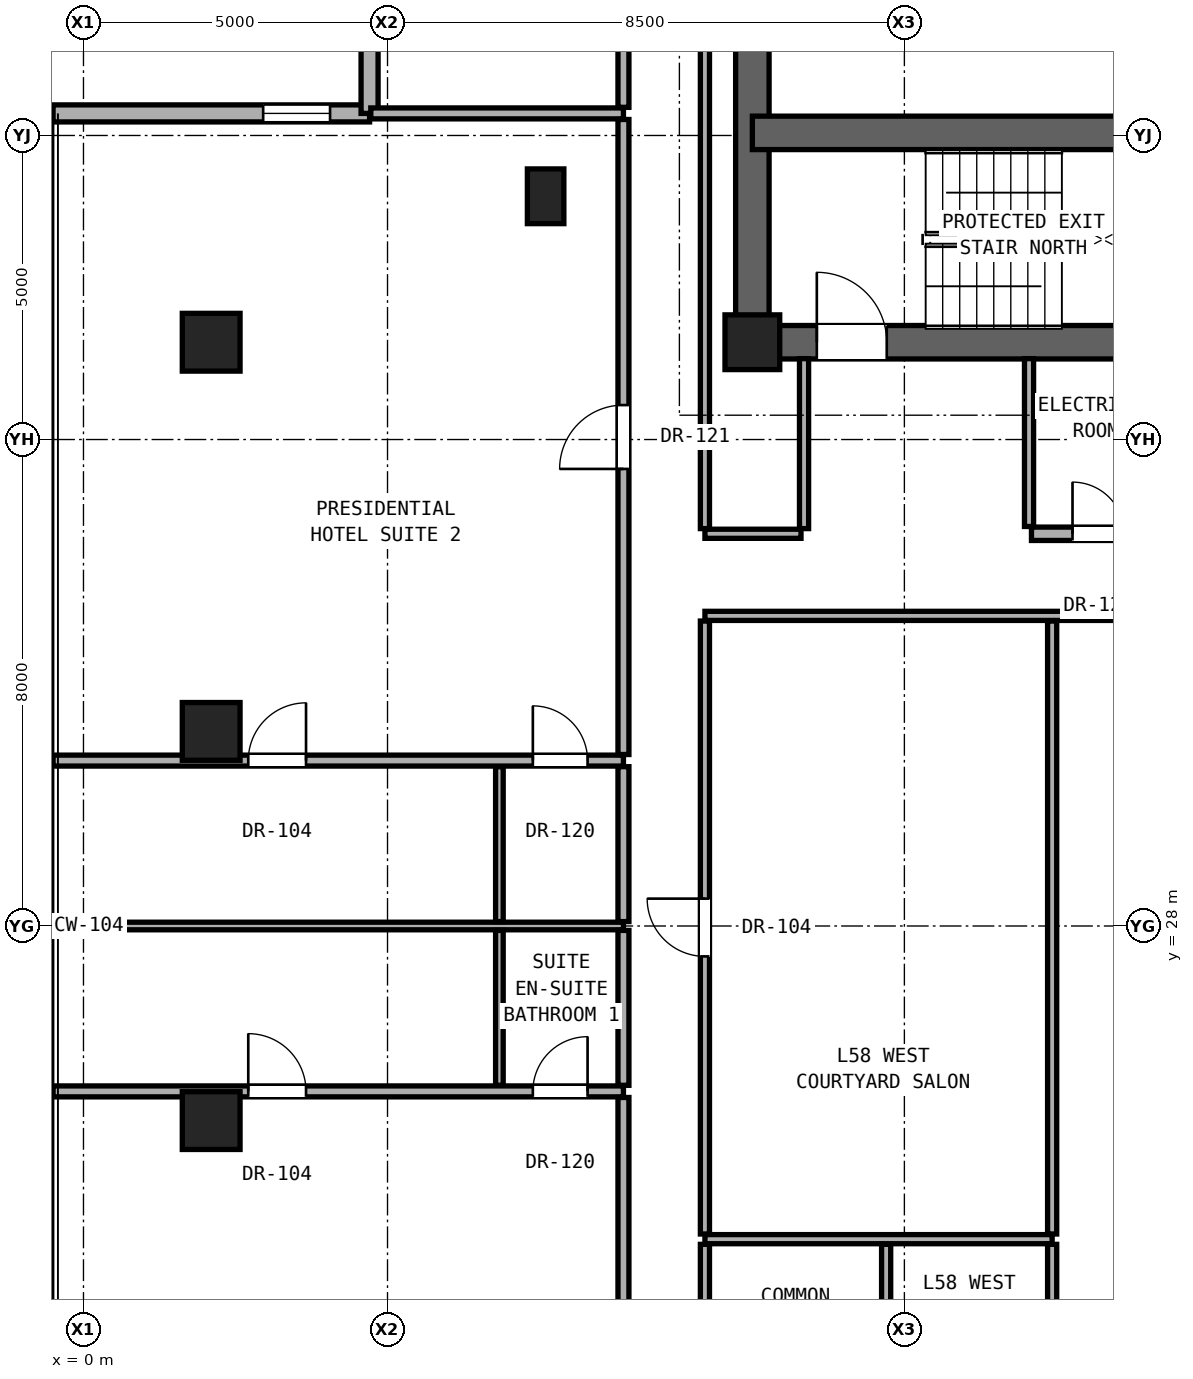
"""IFC4 building model, lengths in metres.
Left out: names, types, materials, properties, quantities, classifications, styles, units other than length and angle.
Written with IfcOpenShell. Run it as: python <this file> out.ifc"""

import sys

from ifc_helpers import new_model, si_unit, direction, frame, frame_2d, origin, origin_2d, place, context, subcontext, project, spatial, rectangle, hollow_rectangle, extrude, element, fill, save


model = new_model("IFC4")
c1 = context("Model", 3, precision=1e-05, world=origin(), true_north=direction((0.0, 1.0)))
c2 = subcontext(c1, "Body", "Model", "MODEL_VIEW")
j1 = project(units=[si_unit("LENGTHUNIT", "METRE"), si_unit("PLANEANGLEUNIT", "RADIAN")], contexts=[c1])
p1 = place(None, origin())
s1 = spatial("IfcSite", under=j1, at=p1, CompositionType="ELEMENT")
p2 = place(p1, origin())
s2 = spatial("IfcBuilding", under=s1, at=p2, CompositionType="ELEMENT")
p3 = place(p2, frame((0.0, 0.0, 203.15)))
s3 = spatial("IfcBuildingStorey", under=s2, at=p3, CompositionType="ELEMENT", Elevation=203.15)
p4 = place(p3, frame((11.0, 37.6, 0.0), z_axis=(0.0, 0.0, 1.0), x_axis=(1.0, 0.0, 0.0)))
e1 = element("IfcColumn", 1, at=p4, inside=s3, PredefinedType="COLUMN", context=c2, shape_type="SweptSolid", body=[
    extrude(rectangle(XDim=0.9, YDim=0.9, at=origin_2d()), origin(), (0.0, 0.0, 1.0), 3.25),
])
for number, where, z_axis, x_axis in (
    (2, (2.1, 24.8, 0.0), (0.0, 0.0, 1.0), (1.0, 0.0, 0.0)),
    (3, (2.1, 31.2, 0.0), (0.0, 0.0, 1.0), (1.0, 0.0, 0.0)),
    (4, (2.1, 37.6, 0.0), (0.0, 0.0, 1.0), (1.0, 0.0, 0.0)),
):
    element("IfcColumn", number, at=place(p3, frame(where, z_axis=z_axis, x_axis=x_axis)), inside=s3, PredefinedType="COLUMN", context=c2, shape_type="SweptSolid", body=[
        extrude(hollow_rectangle(XDim=0.95, YDim=0.95, WallThickness=0.05, at=origin_2d()), origin(), (0.0, 0.0, 1.0), 3.25),
    ])
p5 = place(p3, frame((7.6, 40.0, 0.0), z_axis=(0.0, 0.0, 1.0), x_axis=(1.0, 0.0, 0.0)))
e5 = element("IfcColumn", 5, at=p5, inside=s3, PredefinedType="PILASTER", context=c2, shape_type="SweptSolid", body=[
    extrude(rectangle(XDim=0.6, YDim=0.9, at=origin_2d()), origin(), (0.0, 0.0, 1.0), 3.25),
])
p6 = place(p3, frame((11.0, 37.6, 0.0), z_axis=(0.0, 0.0, 1.0), x_axis=(0.0, 1.0, 0.0)))
e6 = element("IfcWall", 6, at=p6, inside=s3, PredefinedType="SHEAR", context=c2, shape_type="SweptSolid", body=[
    extrude(rectangle(XDim=6.0, YDim=0.55, at=frame_2d((3.0, 0.0))), origin(), (0.0, 0.0, 1.0), 3.05),
])
p7 = place(p3, frame((11.0, 37.6, 0.0), z_axis=(0.0, 0.0, 1.0), x_axis=(1.0, 0.0, 0.0)))
e7 = element("IfcWall", 7, at=p7, inside=s3, PredefinedType="SHEAR", context=c2, shape_type="SweptSolid", body=[
    extrude(rectangle(XDim=19.0, YDim=0.55, at=frame_2d((9.5, 0.0))), origin(), (0.0, 0.0, 1.0), 3.05),
])
p8 = place(p7, frame((1.06, 0.0, 0.0)))
e8 = element("IfcOpeningElement", 8, at=p8, cuts=e7, PredefinedType="OPENING", context=c2, shape_type="SweptSolid", body=[
    extrude(rectangle(XDim=1.15, YDim=2.2, at=frame_2d((0.575, 1.1))), frame((0.0, 0.285, 0.0), z_axis=(0.0, -1.0, 0.0), x_axis=(1.0, 0.0, 0.0)), (0.0, 0.0, 1.0), 0.57),
])
p9 = place(p7, frame((9.55, 0.0, 0.0)))
e9 = element("IfcOpeningElement", 9, at=p9, cuts=e7, PredefinedType="OPENING", context=c2, shape_type="SweptSolid", body=[
    extrude(rectangle(XDim=1.4, YDim=2.35, at=frame_2d((0.7, 1.175))), frame((0.0, 0.285, 0.0), z_axis=(0.0, -1.0, 0.0), x_axis=(1.0, 0.0, 0.0)), (0.0, 0.0, 1.0), 0.57),
])
p10 = place(p7, frame((11.95, 0.0, 0.0)))
e10 = element("IfcOpeningElement", 10, at=p10, cuts=e7, PredefinedType="OPENING", context=c2, shape_type="SweptSolid", body=[
    extrude(rectangle(XDim=1.4, YDim=2.35, at=frame_2d((0.7, 1.175))), frame((0.0, 0.285, 0.0), z_axis=(0.0, -1.0, 0.0), x_axis=(1.0, 0.0, 0.0)), (0.0, 0.0, 1.0), 0.57),
])
p11 = place(p3, frame((11.0, 41.043, 0.0), z_axis=(0.0, 0.0, 1.0), x_axis=(1.0, 0.0, 0.0)))
e11 = element("IfcWall", 11, at=p11, inside=s3, PredefinedType="SHEAR", context=c2, shape_type="SweptSolid", body=[
    extrude(rectangle(XDim=9.0, YDim=0.55, at=frame_2d((4.5, 0.0))), origin(), (0.0, 0.0, 1.0), 3.05),
])
p12 = place(p3, frame((4.705, 41.363, 0.0), z_axis=(0.0, 0.0, 1.0), x_axis=(-1.0, 0.0, 0.0)))
e12 = element("IfcWall", 12, at=p12, inside=s3, PredefinedType="SOLIDWALL", context=c2, shape_type="SweptSolid", body=[
    extrude(rectangle(XDim=5.215, YDim=0.28, at=frame_2d((2.607, 0.0))), origin(), (0.0, 0.0, 1.0), 3.03),
])
p13 = place(p12, frame((0.65, 0.0, 0.85)))
e13 = element("IfcOpeningElement", 13, at=p13, cuts=e12, PredefinedType="OPENING", context=c2, shape_type="SweptSolid", body=[
    extrude(rectangle(XDim=1.1, YDim=2.0, at=frame_2d((0.55, 1.0))), frame((0.0, 0.15, 0.0), z_axis=(0.0, -1.0, 0.0), x_axis=(1.0, 0.0, 0.0)), (0.0, 0.0, 1.0), 0.3),
])
p14 = place(p3, frame((4.705, 46.578, 0.0), z_axis=(0.0, 0.0, 1.0), x_axis=(0.0, -1.0, 0.0)))
e14 = element("IfcWall", 14, at=p14, inside=s3, PredefinedType="SOLIDWALL", context=c2, shape_type="SweptSolid", body=[
    extrude(rectangle(XDim=5.215, YDim=0.28, at=frame_2d((2.607, 0.0))), origin(), (0.0, 0.0, 1.0), 3.03),
])
p15 = place(p3, frame((10.22, 22.85, 0.0), z_axis=(0.0, 0.0, 1.0), x_axis=(1.0, 0.0, 0.0)))
e15 = element("IfcWall", 15, at=p15, inside=s3, PredefinedType="PARTITIONING", context=c2, shape_type="SweptSolid", body=[
    extrude(rectangle(XDim=5.71, YDim=0.15, at=frame_2d((2.855, 0.0))), origin(), (0.0, 0.0, 1.0), 2.186),
])
p16 = place(p3, frame((-0.51, 25.28, 0.0), z_axis=(0.0, 0.0, 1.0), x_axis=(1.0, 0.0, 0.0)))
e16 = element("IfcWall", 16, at=p16, inside=s3, PredefinedType="PARTITIONING", context=c2, shape_type="SweptSolid", body=[
    extrude(rectangle(XDim=9.39, YDim=0.18, at=frame_2d((4.695, 0.0))), origin(), (0.0, 0.0, 1.0), 2.269),
])
p17 = place(p16, frame((3.22, 0.0, 0.0)))
e17 = element("IfcOpeningElement", 17, at=p17, cuts=e16, PredefinedType="OPENING", context=c2, shape_type="SweptSolid", body=[
    extrude(rectangle(XDim=0.95, YDim=2.15, at=frame_2d((0.475, 1.075))), frame((0.0, 0.1, 0.0), z_axis=(0.0, -1.0, 0.0), x_axis=(1.0, 0.0, 0.0)), (0.0, 0.0, 1.0), 0.2),
])
p18 = place(p16, frame((7.9, 0.0, 0.0)))
e18 = element("IfcOpeningElement", 18, at=p18, cuts=e16, PredefinedType="OPENING", context=c2, shape_type="SweptSolid", body=[
    extrude(rectangle(XDim=0.9, YDim=2.1, at=frame_2d((0.45, 1.05))), frame((0.0, 0.1, 0.0), z_axis=(0.0, -1.0, 0.0), x_axis=(1.0, 0.0, 0.0)), (0.0, 0.0, 1.0), 0.2),
])
p19 = place(p3, frame((-0.51, 28.0, 0.0), z_axis=(0.0, 0.0, 1.0), x_axis=(1.0, 0.0, 0.0)))
e19 = element("IfcWall", 19, at=p19, inside=s3, PredefinedType="PARTITIONING", context=c2, shape_type="SweptSolid", body=[
    extrude(rectangle(XDim=9.39, YDim=0.125, at=frame_2d((4.695, 0.0))), origin(), (0.0, 0.0, 1.0), 2.269),
])
p20 = place(p3, frame((-0.51, 30.72, 0.0), z_axis=(0.0, 0.0, 1.0), x_axis=(1.0, 0.0, 0.0)))
e20 = element("IfcWall", 20, at=p20, inside=s3, PredefinedType="PARTITIONING", context=c2, shape_type="SweptSolid", body=[
    extrude(rectangle(XDim=9.39, YDim=0.18, at=frame_2d((4.695, 0.0))), origin(), (0.0, 0.0, 1.0), 2.269),
])
p21 = place(p20, frame((3.22, 0.0, 0.0)))
e21 = element("IfcOpeningElement", 21, at=p21, cuts=e20, PredefinedType="OPENING", context=c2, shape_type="SweptSolid", body=[
    extrude(rectangle(XDim=0.95, YDim=2.15, at=frame_2d((0.475, 1.075))), frame((0.0, 0.1, 0.0), z_axis=(0.0, -1.0, 0.0), x_axis=(1.0, 0.0, 0.0)), (0.0, 0.0, 1.0), 0.2),
])
p22 = place(p20, frame((7.9, 0.0, 0.0)))
e22 = element("IfcOpeningElement", 22, at=p22, cuts=e20, PredefinedType="OPENING", context=c2, shape_type="SweptSolid", body=[
    extrude(rectangle(XDim=0.9, YDim=2.1, at=frame_2d((0.45, 1.05))), frame((0.0, 0.1, 0.0), z_axis=(0.0, -1.0, 0.0), x_axis=(1.0, 0.0, 0.0)), (0.0, 0.0, 1.0), 0.2),
])
p23 = place(p3, frame((10.22, 33.1, 0.0), z_axis=(0.0, 0.0, 1.0), x_axis=(1.0, 0.0, 0.0)))
e23 = element("IfcWall", 23, at=p23, inside=s3, PredefinedType="PARTITIONING", context=c2, shape_type="SweptSolid", body=[
    extrude(rectangle(XDim=20.56, YDim=0.15, at=frame_2d((10.28, 0.0))), origin(), (0.0, 0.0, 1.0), 2.186),
])
p24 = place(p23, frame((12.636, 0.0, 0.0)))
e24 = element("IfcOpeningElement", 24, at=p24, cuts=e23, PredefinedType="OPENING", context=c2, shape_type="SweptSolid", body=[
    extrude(rectangle(XDim=0.85, YDim=2.01, at=frame_2d((0.425, 1.005))), frame((0.0, 0.085, 0.0), z_axis=(0.0, -1.0, 0.0), x_axis=(1.0, 0.0, 0.0)), (0.0, 0.0, 1.0), 0.17),
])
p25 = place(p23, frame((17.665, 0.0, 0.0)))
e25 = element("IfcOpeningElement", 25, at=p25, cuts=e23, PredefinedType="OPENING", context=c2, shape_type="SweptSolid", body=[
    extrude(rectangle(XDim=0.85, YDim=2.01, at=frame_2d((0.425, 1.005))), frame((0.0, 0.085, 0.0), z_axis=(0.0, -1.0, 0.0), x_axis=(1.0, 0.0, 0.0)), (0.0, 0.0, 1.0), 0.17),
])
p26 = place(p3, frame((10.22, 34.45, 0.0), z_axis=(0.0, 0.0, 1.0), x_axis=(1.0, 0.0, 0.0)))
e26 = element("IfcWall", 26, at=p26, inside=s3, PredefinedType="PARTITIONING", context=c2, shape_type="SweptSolid", body=[
    extrude(rectangle(XDim=1.58, YDim=0.15, at=frame_2d((0.79, 0.0))), origin(), (0.0, 0.0, 1.0), 2.186),
])
p27 = place(p3, frame((15.59, 34.45, 0.0), z_axis=(0.0, 0.0, 1.0), x_axis=(1.0, 0.0, 0.0)))
e27 = element("IfcWall", 27, at=p27, inside=s3, PredefinedType="SOLIDWALL", context=c2, shape_type="SweptSolid", body=[
    extrude(rectangle(XDim=15.19, YDim=0.22, at=frame_2d((7.595, 0.0))), origin(), (0.0, 0.0, 1.0), 2.186),
])
p28 = place(p27, frame((6.435, 0.0, 0.0)))
e28 = element("IfcOpeningElement", 28, at=p28, cuts=e27, PredefinedType="OPENING", context=c2, shape_type="SweptSolid", body=[
    extrude(rectangle(XDim=0.85, YDim=2.01, at=frame_2d((0.425, 1.005))), frame((0.0, 0.12, 0.0), z_axis=(0.0, -1.0, 0.0), x_axis=(1.0, 0.0, 0.0)), (0.0, 0.0, 1.0), 0.24),
])
p29 = place(p27, frame((9.96, 0.0, 0.0)))
e29 = element("IfcOpeningElement", 29, at=p29, cuts=e27, PredefinedType="OPENING", context=c2, shape_type="SweptSolid", body=[
    extrude(rectangle(XDim=0.95, YDim=2.15, at=frame_2d((0.475, 1.075))), frame((0.0, 0.12, 0.0), z_axis=(0.0, -1.0, 0.0), x_axis=(1.0, 0.0, 0.0)), (0.0, 0.0, 1.0), 0.24),
])
p30 = place(p27, frame((12.21, 0.0, 0.0)))
e30 = element("IfcOpeningElement", 30, at=p30, cuts=e27, PredefinedType="OPENING", context=c2, shape_type="SweptSolid", body=[
    extrude(rectangle(XDim=0.95, YDim=2.15, at=frame_2d((0.475, 1.075))), frame((0.0, 0.12, 0.0), z_axis=(0.0, -1.0, 0.0), x_axis=(1.0, 0.0, 0.0)), (0.0, 0.0, 1.0), 0.24),
])
p31 = place(p27, frame((0.675, 0.0, 0.0)))
e31 = element("IfcOpeningElement", 31, at=p31, cuts=e27, PredefinedType="OPENING", context=c2, shape_type="SweptSolid", body=[
    extrude(rectangle(XDim=0.85, YDim=2.01, at=frame_2d((0.425, 1.005))), frame((0.0, 0.12, 0.0), z_axis=(0.0, -1.0, 0.0), x_axis=(1.0, 0.0, 0.0)), (0.0, 0.0, 1.0), 0.24),
])
p32 = place(p27, frame((2.835, 0.0, 0.0)))
e32 = element("IfcOpeningElement", 32, at=p32, cuts=e27, PredefinedType="OPENING", context=c2, shape_type="SweptSolid", body=[
    extrude(rectangle(XDim=0.85, YDim=2.01, at=frame_2d((0.425, 1.005))), frame((0.0, 0.12, 0.0), z_axis=(0.0, -1.0, 0.0), x_axis=(1.0, 0.0, 0.0)), (0.0, 0.0, 1.0), 0.24),
])
p33 = place(p3, frame((4.725, 41.363, 0.0), z_axis=(0.0, 0.0, 1.0), x_axis=(1.0, 0.0, 0.0)))
e33 = element("IfcWall", 33, at=p33, inside=s3, PredefinedType="PARTITIONING", context=c2, shape_type="SweptSolid", body=[
    extrude(rectangle(XDim=4.155, YDim=0.18, at=frame_2d((2.077, 0.0))), origin(), (0.0, 0.0, 1.0), 3.05),
])
for number, where, z_axis, x_axis in (
    (34, (6.84, 25.38, 0.0), (0.0, 0.0, 1.0), (0.0, 1.0, 0.0)),
    (35, (6.84, 28.073, 0.0), (0.0, 0.0, 1.0), (0.0, 1.0, 0.0)),
):
    element("IfcWall", number, at=place(p3, frame(where, z_axis=z_axis, x_axis=x_axis)), inside=s3, PredefinedType="PARTITIONING", context=c2, shape_type="SweptSolid", body=[
        extrude(rectangle(XDim=2.548, YDim=0.125, at=frame_2d((1.274, 0.0))), origin(), (0.0, 0.0, 1.0), 3.05),
    ])
p34 = place(p3, frame((8.88, 14.737, 0.0), z_axis=(0.0, 0.0, 1.0), x_axis=(0.0, 1.0, 0.0)))
e36 = element("IfcWall", 36, at=p34, inside=s3, PredefinedType="PARTITIONING", context=c2, shape_type="SweptSolid", body=[
    extrude(rectangle(XDim=10.443, YDim=0.18, at=frame_2d((5.221, 0.0))), origin(), (0.0, 0.0, 1.0), 2.346),
])
p35 = place(p34, frame((4.697, 0.0, 0.0)))
e37 = element("IfcOpeningElement", 37, at=p35, cuts=e36, PredefinedType="OPENING", context=c2, shape_type="SweptSolid", body=[
    extrude(rectangle(XDim=1.05, YDim=2.2, at=frame_2d((0.525, 1.1))), frame((0.0, 0.1, 0.0), z_axis=(0.0, -1.0, 0.0), x_axis=(1.0, 0.0, 0.0)), (0.0, 0.0, 1.0), 0.2),
])
for number, where, z_axis, x_axis in (
    (38, (8.88, 25.38, 0.0), (0.0, 0.0, 1.0), (0.0, 1.0, 0.0)),
    (39, (8.88, 28.073, 0.0), (0.0, 0.0, 1.0), (0.0, 1.0, 0.0)),
):
    element("IfcWall", number, at=place(p3, frame(where, z_axis=z_axis, x_axis=x_axis)), inside=s3, PredefinedType="PARTITIONING", context=c2, shape_type="SweptSolid", body=[
        extrude(rectangle(XDim=2.548, YDim=0.18, at=frame_2d((1.274, 0.0))), origin(), (0.0, 0.0, 1.0), 3.05),
    ])
p36 = place(p3, frame((8.88, 30.82, 0.0), z_axis=(0.0, 0.0, 1.0), x_axis=(0.0, 1.0, 0.0)))
e40 = element("IfcWall", 40, at=p36, inside=s3, PredefinedType="PARTITIONING", context=c2, shape_type="SweptSolid", body=[
    extrude(rectangle(XDim=10.443, YDim=0.18, at=frame_2d((5.221, 0.0))), origin(), (0.0, 0.0, 1.0), 2.346),
])
p37 = place(p36, frame((4.697, 0.0, 0.0)))
e41 = element("IfcOpeningElement", 41, at=p37, cuts=e40, PredefinedType="OPENING", context=c2, shape_type="SweptSolid", body=[
    extrude(rectangle(XDim=1.05, YDim=2.2, at=frame_2d((0.525, 1.1))), frame((0.0, 0.1, 0.0), z_axis=(0.0, -1.0, 0.0), x_axis=(1.0, 0.0, 0.0)), (0.0, 0.0, 1.0), 0.2),
])
p38 = place(p3, frame((8.88, 41.463, 0.0), z_axis=(0.0, 0.0, 1.0), x_axis=(0.0, 1.0, 0.0)))
e42 = element("IfcWall", 42, at=p38, inside=s3, PredefinedType="PARTITIONING", context=c2, shape_type="SweptSolid", body=[
    extrude(rectangle(XDim=5.115, YDim=0.18, at=frame_2d((2.558, 0.0))), origin(), (0.0, 0.0, 1.0), 3.05),
])
p39 = place(p38, frame((2.083, 0.0, 0.0)))
e43 = element("IfcOpeningElement", 43, at=p39, cuts=e42, PredefinedType="OPENING", context=c2, shape_type="SweptSolid", body=[
    extrude(rectangle(XDim=0.95, YDim=2.15, at=frame_2d((0.475, 1.075))), frame((0.0, 0.1, 0.0), z_axis=(0.0, -1.0, 0.0), x_axis=(1.0, 0.0, 0.0)), (0.0, 0.0, 1.0), 0.2),
])
p40 = place(p3, frame((10.22, 19.985, 0.0), z_axis=(0.0, 0.0, 1.0), x_axis=(0.0, 1.0, 0.0)))
e44 = element("IfcWall", 44, at=p40, inside=s3, PredefinedType="PARTITIONING", context=c2, shape_type="SweptSolid", body=[
    extrude(rectangle(XDim=2.78, YDim=0.15, at=frame_2d((1.39, 0.0))), origin(), (0.0, 0.0, 1.0), 3.05),
])
p41 = place(p3, frame((10.22, 22.935, 0.0), z_axis=(0.0, 0.0, 1.0), x_axis=(0.0, 1.0, 0.0)))
e45 = element("IfcWall", 45, at=p41, inside=s3, PredefinedType="PARTITIONING", context=c2, shape_type="SweptSolid", body=[
    extrude(rectangle(XDim=10.08, YDim=0.15, at=frame_2d((5.04, 0.0))), origin(), (0.0, 0.0, 1.0), 2.346),
])
p42 = place(p41, frame((4.565, 0.0, 0.0)))
e46 = element("IfcOpeningElement", 46, at=p42, cuts=e45, PredefinedType="OPENING", context=c2, shape_type="SweptSolid", body=[
    extrude(rectangle(XDim=0.95, YDim=2.15, at=frame_2d((0.475, 1.075))), frame((0.0, 0.085, 0.0), z_axis=(0.0, -1.0, 0.0), x_axis=(1.0, 0.0, 0.0)), (0.0, 0.0, 1.0), 0.17),
])
p43 = place(p3, frame((10.22, 34.535, 0.0), z_axis=(0.0, 0.0, 1.0), x_axis=(0.0, 1.0, 0.0)))
e47 = element("IfcWall", 47, at=p43, inside=s3, PredefinedType="PARTITIONING", context=c2, shape_type="SweptSolid", body=[
    extrude(rectangle(XDim=9.13, YDim=0.15, at=frame_2d((4.565, 0.0))), origin(), (0.0, 0.0, 1.0), 2.442),
])
p44 = place(p3, frame((11.85, 34.535, 0.0), z_axis=(0.0, 0.0, 1.0), x_axis=(0.0, 1.0, 0.0)))
e48 = element("IfcWall", 48, at=p44, inside=s3, PredefinedType="PARTITIONING", context=c2, shape_type="SweptSolid", body=[
    extrude(rectangle(XDim=2.795, YDim=0.15, at=frame_2d((1.397, 0.0))), origin(), (0.0, 0.0, 1.0), 3.05),
])
p45 = place(p3, frame((13.2, 19.985, 0.0), z_axis=(0.0, 0.0, 1.0), x_axis=(0.0, 1.0, 0.0)))
e49 = element("IfcWall", 49, at=p45, inside=s3, PredefinedType="PARTITIONING", context=c2, shape_type="SweptSolid", body=[
    extrude(rectangle(XDim=2.78, YDim=0.15, at=frame_2d((1.39, 0.0))), origin(), (0.0, 0.0, 1.0), 3.05),
])
p46 = place(p3, frame((15.55, 34.57, 0.0), z_axis=(0.0, 0.0, 1.0), x_axis=(0.0, 1.0, 0.0)))
e50 = element("IfcWall", 50, at=p46, inside=s3, PredefinedType="PARTITIONING", context=c2, shape_type="SweptSolid", body=[
    extrude(rectangle(XDim=2.76, YDim=0.15, at=frame_2d((1.38, 0.0))), origin(), (0.0, 0.0, 1.0), 3.05),
])
p47 = place(p3, frame((15.93, 19.985, 0.0), z_axis=(0.0, 0.0, 1.0), x_axis=(0.0, 1.0, 0.0)))
e51 = element("IfcWall", 51, at=p47, inside=s3, PredefinedType="PARTITIONING", context=c2, shape_type="SweptSolid", body=[
    extrude(rectangle(XDim=2.78, YDim=0.15, at=frame_2d((1.39, 0.0))), origin(), (0.0, 0.0, 1.0), 3.05),
])
p48 = place(p3, frame((15.93, 22.935, 0.0), z_axis=(0.0, 0.0, 1.0), x_axis=(0.0, 1.0, 0.0)))
e52 = element("IfcWall", 52, at=p48, inside=s3, PredefinedType="PARTITIONING", context=c2, shape_type="SweptSolid", body=[
    extrude(rectangle(XDim=10.08, YDim=0.15, at=frame_2d((5.04, 0.0))), origin(), (0.0, 0.0, 1.0), 2.186),
])
p49 = place(p13, origin())
e53 = element("IfcWindow", 53, at=p49, inside=s3, PartitioningType="SINGLE_PANEL", PredefinedType="WINDOW", context=c2, shape_type="SweptSolid", body=[
    extrude(rectangle(XDim=1.1, YDim=2.0, at=frame_2d((0.55, 1.0))), frame((0.0, 0.03, 0.0), z_axis=(0.0, -1.0, 0.0), x_axis=(1.0, 0.0, 0.0)), (0.0, 0.0, 1.0), 0.06),
])
fill(e13, e53)
p50 = place(p8, origin())
e54 = element("IfcDoor", 54, at=p50, inside=s3, OperationType="SINGLE_SWING_LEFT", PredefinedType="DOOR", context=c2, shape_type="SweptSolid", body=[
    extrude(rectangle(XDim=1.15, YDim=2.2, at=frame_2d((0.575, 1.1))), frame((0.0, 0.025, 0.0), z_axis=(0.0, -1.0, 0.0), x_axis=(1.0, 0.0, 0.0)), (0.0, 0.0, 1.0), 0.05),
])
fill(e8, e54)
p51 = place(p31, origin())
e55 = element("IfcDoor", 55, at=p51, inside=s3, OperationType="SINGLE_SWING_LEFT", PredefinedType="DOOR", context=c2, shape_type="SweptSolid", body=[
    extrude(rectangle(XDim=0.85, YDim=2.01, at=frame_2d((0.425, 1.005))), frame((0.0, 0.025, 0.0), z_axis=(0.0, -1.0, 0.0), x_axis=(1.0, 0.0, 0.0)), (0.0, 0.0, 1.0), 0.05),
])
fill(e31, e55)
p52 = place(p17, origin())
e56 = element("IfcDoor", 56, at=p52, inside=s3, OperationType="SINGLE_SWING_LEFT", PredefinedType="DOOR", context=c2, shape_type="SweptSolid", body=[
    extrude(rectangle(XDim=0.95, YDim=2.15, at=frame_2d((0.475, 1.075))), frame((0.0, 0.025, 0.0), z_axis=(0.0, -1.0, 0.0), x_axis=(1.0, 0.0, 0.0)), (0.0, 0.0, 1.0), 0.05),
])
fill(e17, e56)
p53 = place(p18, origin())
e57 = element("IfcDoor", 57, at=p53, inside=s3, OperationType="SINGLE_SWING_RIGHT", PredefinedType="DOOR", context=c2, shape_type="SweptSolid", body=[
    extrude(rectangle(XDim=0.9, YDim=2.1, at=frame_2d((0.45, 1.05))), frame((0.0, 0.025, 0.0), z_axis=(0.0, -1.0, 0.0), x_axis=(1.0, 0.0, 0.0)), (0.0, 0.0, 1.0), 0.05),
])
fill(e18, e57)
p54 = place(p37, origin())
e58 = element("IfcDoor", 58, at=p54, inside=s3, OperationType="SINGLE_SWING_LEFT", PredefinedType="DOOR", context=c2, shape_type="SweptSolid", body=[
    extrude(rectangle(XDim=1.05, YDim=2.2, at=frame_2d((0.525, 1.1))), frame((0.0, 0.025, 0.0), z_axis=(0.0, -1.0, 0.0), x_axis=(1.0, 0.0, 0.0)), (0.0, 0.0, 1.0), 0.05),
])
fill(e41, e58)
p55 = place(p21, origin())
e59 = element("IfcDoor", 59, at=p55, inside=s3, OperationType="SINGLE_SWING_RIGHT", PredefinedType="DOOR", context=c2, shape_type="SweptSolid", body=[
    extrude(rectangle(XDim=0.95, YDim=2.15, at=frame_2d((0.475, 1.075))), frame((0.0, 0.025, 0.0), z_axis=(0.0, -1.0, 0.0), x_axis=(1.0, 0.0, 0.0)), (0.0, 0.0, 1.0), 0.05),
])
fill(e21, e59)
p56 = place(p22, origin())
e60 = element("IfcDoor", 60, at=p56, inside=s3, OperationType="SINGLE_SWING_LEFT", PredefinedType="DOOR", context=c2, shape_type="SweptSolid", body=[
    extrude(rectangle(XDim=0.9, YDim=2.1, at=frame_2d((0.45, 1.05))), frame((0.0, 0.025, 0.0), z_axis=(0.0, -1.0, 0.0), x_axis=(1.0, 0.0, 0.0)), (0.0, 0.0, 1.0), 0.05),
])
fill(e22, e60)
p57 = place(p42, origin())
e61 = element("IfcDoor", 61, at=p57, inside=s3, OperationType="SINGLE_SWING_RIGHT", PredefinedType="DOOR", context=c2, shape_type="SweptSolid", body=[
    extrude(rectangle(XDim=0.95, YDim=2.15, at=frame_2d((0.475, 1.075))), frame((0.0, 0.025, 0.0), z_axis=(0.0, -1.0, 0.0), x_axis=(1.0, 0.0, 0.0)), (0.0, 0.0, 1.0), 0.05),
])
fill(e46, e61)
save(model, sys.argv[1])
